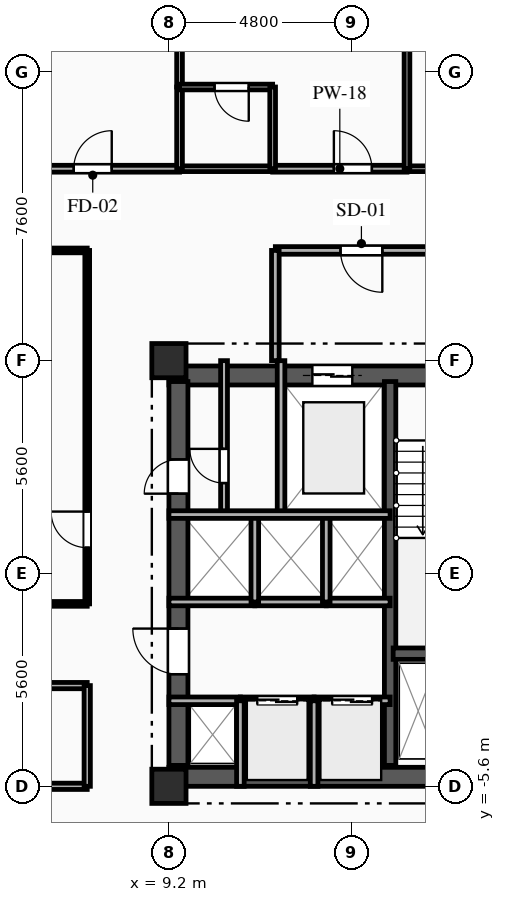
"""IFC4 building model, lengths in metres.
Left out: names, types, materials, properties, quantities, classifications, styles, units other than length and angle.
Written with IfcOpenShell. Run it as: python <this file> out.ifc"""

import sys

from ifc_helpers import new_model, si_unit, direction, frame, frame_2d, origin, origin_2d, place, context, subcontext, project, spatial, rectangle, extrude, element, fill, save


model = new_model("IFC4")
c1 = context("Model", 3, precision=1e-05, world=origin(), true_north=direction((0.0, 1.0)))
c2 = subcontext(c1, "Body", "Model", "MODEL_VIEW")
j1 = project(units=[si_unit("LENGTHUNIT", "METRE"), si_unit("PLANEANGLEUNIT", "RADIAN")], contexts=[c1])
p1 = place(None, origin())
s1 = spatial("IfcSite", under=j1, at=p1, CompositionType="ELEMENT")
p2 = place(p1, origin())
s2 = spatial("IfcBuilding", under=s1, at=p2, CompositionType="ELEMENT")
p3 = place(p2, frame((0.0, 0.0, 141.05)))
s3 = spatial("IfcBuildingStorey", under=s2, at=p3, CompositionType="ELEMENT", Elevation=141.05)
for number, where, z_axis, x_axis in (
    (1, (9.2, -5.6, 0.0), (0.0, 0.0, 1.0), (1.0, 0.0, 0.0)),
    (2, (9.2, 5.6, 0.0), (0.0, 0.0, 1.0), (1.0, 0.0, 0.0)),
):
    element("IfcColumn", number, at=place(p3, frame(where, z_axis=z_axis, x_axis=x_axis)), inside=s3, PredefinedType="COLUMN", context=c2, shape_type="SweptSolid", body=[
        extrude(rectangle(XDim=0.9, YDim=0.9, at=origin_2d()), origin(), (0.0, 0.0, 1.0), 3.35),
    ])
p4 = place(p3, frame((9.2, 5.21, 0.0), z_axis=(0.0, 0.0, 1.0), x_axis=(1.0, 0.0, 0.0)))
e3 = element("IfcWall", 3, at=p4, inside=s3, PredefinedType="SHEAR", context=c2, shape_type="SweptSolid", body=[
    extrude(rectangle(XDim=9.6, YDim=0.5, at=frame_2d((4.8, 0.0))), origin(), (0.0, 0.0, 1.0), 3.04),
])
p5 = place(p4, frame((6.95, 0.0, 0.0)))
e4 = element("IfcOpeningElement", 4, at=p5, cuts=e3, PredefinedType="OPENING", context=c2, shape_type="SweptSolid", body=[
    extrude(rectangle(XDim=1.1, YDim=2.15, at=frame_2d((0.55, 1.075))), frame((0.0, 0.26, 0.0), z_axis=(0.0, -1.0, 0.0), x_axis=(1.0, 0.0, 0.0)), (0.0, 0.0, 1.0), 0.52),
])
p6 = place(p4, frame((3.775, 0.0, 0.0)))
e5 = element("IfcOpeningElement", 5, at=p6, cuts=e3, PredefinedType="OPENING", context=c2, shape_type="SweptSolid", body=[
    extrude(rectangle(XDim=1.05, YDim=2.1, at=frame_2d((0.525, 1.05))), frame((0.0, 0.26, 0.0), z_axis=(0.0, -1.0, 0.0), x_axis=(1.0, 0.0, 0.0)), (0.0, 0.0, 1.0), 0.52),
])
p7 = place(p3, frame((9.2, -5.35, 0.0), z_axis=(0.0, 0.0, 1.0), x_axis=(1.0, 0.0, 0.0)))
e6 = element("IfcWall", 6, at=p7, inside=s3, PredefinedType="SHEAR", context=c2, shape_type="SweptSolid", body=[
    extrude(rectangle(XDim=9.6, YDim=0.5, at=frame_2d((4.8, 0.0))), origin(), (0.0, 0.0, 1.0), 3.04),
])
p8 = place(p7, frame((7.65, 0.0, 0.0)))
e7 = element("IfcOpeningElement", 7, at=p8, cuts=e6, PredefinedType="OPENING", context=c2, shape_type="SweptSolid", body=[
    extrude(rectangle(XDim=0.9, YDim=2.1, at=frame_2d((0.45, 1.05))), frame((0.0, 0.26, 0.0), z_axis=(0.0, -1.0, 0.0), x_axis=(1.0, 0.0, 0.0)), (0.0, 0.0, 1.0), 0.52),
])
p9 = place(p3, frame((9.45, -5.05, 0.0), z_axis=(0.0, 0.0, 1.0), x_axis=(0.0, 1.0, 0.0)))
e8 = element("IfcWall", 8, at=p9, inside=s3, PredefinedType="SHEAR", context=c2, shape_type="SweptSolid", body=[
    extrude(rectangle(XDim=10.1, YDim=0.5, at=frame_2d((5.05, 0.0))), origin(), (0.0, 0.0, 1.0), 3.04),
])
p10 = place(p9, frame((7.15, 0.0, 0.0)))
e9 = element("IfcOpeningElement", 9, at=p10, cuts=e8, PredefinedType="OPENING", context=c2, shape_type="SweptSolid", body=[
    extrude(rectangle(XDim=0.9, YDim=2.1, at=frame_2d((0.45, 1.05))), frame((0.0, 0.26, 0.0), z_axis=(0.0, -1.0, 0.0), x_axis=(1.0, 0.0, 0.0)), (0.0, 0.0, 1.0), 0.52),
])
p11 = place(p9, frame((2.4, 0.0, 0.0)))
e10 = element("IfcOpeningElement", 10, at=p11, cuts=e8, PredefinedType="OPENING", context=c2, shape_type="SweptSolid", body=[
    extrude(rectangle(XDim=1.2, YDim=2.15, at=frame_2d((0.6, 1.075))), frame((0.0, 0.26, 0.0), z_axis=(0.0, -1.0, 0.0), x_axis=(1.0, 0.0, 0.0)), (0.0, 0.0, 1.0), 0.52),
])
p12 = place(p3, frame((15.02, -5.05, 0.0), z_axis=(0.0, 0.0, 1.0), x_axis=(0.0, 1.0, 0.0)))
e11 = element("IfcWall", 11, at=p12, inside=s3, PredefinedType="SHEAR", context=c2, shape_type="SweptSolid", body=[
    extrude(rectangle(XDim=10.1, YDim=0.3, at=frame_2d((5.05, 0.0))), origin(), (0.0, 0.0, 1.0), 3.04),
])
p13 = place(p3, frame((15.1, -2.11, 0.0), z_axis=(0.0, 0.0, 1.0), x_axis=(1.0, 0.0, 0.0)))
e12 = element("IfcWall", 12, at=p13, inside=s3, PredefinedType="SHEAR", context=c2, shape_type="SweptSolid", body=[
    extrude(rectangle(XDim=3.18, YDim=0.3, at=frame_2d((1.59, 0.0))), origin(), (0.0, 0.0, 1.0), 3.04),
])
p14 = place(p3, frame((12.15, 5.6, 0.0), z_axis=(0.0, 0.0, 1.0), x_axis=(0.0, -1.0, 0.0)))
e13 = element("IfcWall", 13, at=p14, inside=s3, PredefinedType="PARTITIONING", context=c2, shape_type="SweptSolid", body=[
    extrude(rectangle(XDim=4.05, YDim=0.2, at=frame_2d((2.025, 0.0))), origin(), (0.0, 0.0, 1.0), 3.04),
])
p15 = place(p3, frame((18.8, 8.5, 0.0), z_axis=(0.0, 0.0, 1.0), x_axis=(-1.0, 0.0, 0.0)))
e14 = element("IfcWall", 14, at=p15, inside=s3, PredefinedType="PARTITIONING", context=c2, shape_type="SweptSolid", body=[
    extrude(rectangle(XDim=6.8, YDim=0.2, at=frame_2d((3.4, 0.0))), origin(), (0.0, 0.0, 1.0), 3.04),
])
p16 = place(p15, frame((3.985, 0.0, 0.0)))
e15 = element("IfcOpeningElement", 15, at=p16, cuts=e14, PredefinedType="OPENING", context=c2, shape_type="SweptSolid", body=[
    extrude(rectangle(XDim=1.1, YDim=2.15, at=frame_2d((0.55, 1.075))), frame((0.0, 0.11, 0.0), z_axis=(0.0, -1.0, 0.0), x_axis=(1.0, 0.0, 0.0)), (0.0, 0.0, 1.0), 0.22),
])
p17 = place(p3, frame((12.0, 8.5, 0.0), z_axis=(0.0, 0.0, 1.0), x_axis=(0.0, -1.0, 0.0)))
e16 = element("IfcWall", 16, at=p17, inside=s3, PredefinedType="PARTITIONING", context=c2, shape_type="SweptSolid", body=[
    extrude(rectangle(XDim=2.9, YDim=0.2, at=frame_2d((1.45, 0.0))), origin(), (0.0, 0.0, 1.0), 3.04),
])
p18 = place(p3, frame((10.65, 1.55, 0.0), z_axis=(0.0, 0.0, 1.0), x_axis=(0.0, 1.0, 0.0)))
e17 = element("IfcWall", 17, at=p18, inside=s3, PredefinedType="PARTITIONING", context=c2, shape_type="SweptSolid", body=[
    extrude(rectangle(XDim=4.05, YDim=0.18, at=frame_2d((2.025, 0.0))), origin(), (0.0, 0.0, 1.0), 3.04),
])
p19 = place(p18, frame((0.829, 0.0, 0.0)))
e18 = element("IfcOpeningElement", 18, at=p19, cuts=e17, PredefinedType="OPENING", context=c2, shape_type="SweptSolid", body=[
    extrude(rectangle(XDim=0.9, YDim=2.1, at=frame_2d((0.45, 1.05))), frame((0.0, 0.1, 0.0), z_axis=(0.0, -1.0, 0.0), x_axis=(1.0, 0.0, 0.0)), (0.0, 0.0, 1.0), 0.2),
])
p20 = place(p3, frame((9.2, -3.35, 0.0), z_axis=(0.0, 0.0, 1.0), x_axis=(1.0, 0.0, 0.0)))
e19 = element("IfcWall", 19, at=p20, inside=s3, PredefinedType="PARTITIONING", context=c2, shape_type="SweptSolid", body=[
    extrude(rectangle(XDim=1.88, YDim=0.2, at=frame_2d((0.94, 0.0))), origin(), (0.0, 0.0, 1.0), 2.755),
])
p21 = place(p3, frame((11.08, -3.35, 0.0), z_axis=(0.0, 0.0, 1.0), x_axis=(1.0, 0.0, 0.0)))
e20 = element("IfcWall", 20, at=p21, inside=s3, PredefinedType="PARTITIONING", context=c2, shape_type="SweptSolid", body=[
    extrude(rectangle(XDim=1.94, YDim=0.2, at=frame_2d((0.97, 0.0))), origin(), (0.0, 0.0, 1.0), 3.04),
])
p22 = place(p21, frame((0.445, 0.0, 0.0)))
e21 = element("IfcOpeningElement", 21, at=p22, cuts=e20, PredefinedType="OPENING", context=c2, shape_type="SweptSolid", body=[
    extrude(rectangle(XDim=1.05, YDim=2.1, at=frame_2d((0.525, 1.05))), frame((0.0, 0.11, 0.0), z_axis=(0.0, -1.0, 0.0), x_axis=(1.0, 0.0, 0.0)), (0.0, 0.0, 1.0), 0.22),
])
p23 = place(p3, frame((13.02, -3.35, 0.0), z_axis=(0.0, 0.0, 1.0), x_axis=(1.0, 0.0, 0.0)))
e22 = element("IfcWall", 22, at=p23, inside=s3, PredefinedType="PARTITIONING", context=c2, shape_type="SweptSolid", body=[
    extrude(rectangle(XDim=2.0, YDim=0.2, at=frame_2d((1.0, 0.0))), origin(), (0.0, 0.0, 1.0), 3.04),
])
p24 = place(p23, frame((0.475, 0.0, 0.0)))
e23 = element("IfcOpeningElement", 23, at=p24, cuts=e22, PredefinedType="OPENING", context=c2, shape_type="SweptSolid", body=[
    extrude(rectangle(XDim=1.05, YDim=2.1, at=frame_2d((0.525, 1.05))), frame((0.0, 0.11, 0.0), z_axis=(0.0, -1.0, 0.0), x_axis=(1.0, 0.0, 0.0)), (0.0, 0.0, 1.0), 0.22),
])
p25 = place(p3, frame((11.46, -0.75, 0.0), z_axis=(0.0, 0.0, 1.0), x_axis=(-1.0, 0.0, 0.0)))
e24 = element("IfcWall", 24, at=p25, inside=s3, PredefinedType="PARTITIONING", context=c2, shape_type="SweptSolid", body=[
    extrude(rectangle(XDim=2.26, YDim=0.2, at=frame_2d((1.13, 0.0))), origin(), (0.0, 0.0, 1.0), 3.04),
])
p26 = place(p3, frame((13.34, -0.75, 0.0), z_axis=(0.0, 0.0, 1.0), x_axis=(-1.0, 0.0, 0.0)))
e25 = element("IfcWall", 25, at=p26, inside=s3, PredefinedType="PARTITIONING", context=c2, shape_type="SweptSolid", body=[
    extrude(rectangle(XDim=1.88, YDim=0.2, at=frame_2d((0.94, 0.0))), origin(), (0.0, 0.0, 1.0), 3.04),
])
p27 = place(p3, frame((15.02, -0.75, 0.0), z_axis=(0.0, 0.0, 1.0), x_axis=(-1.0, 0.0, 0.0)))
e26 = element("IfcWall", 26, at=p27, inside=s3, PredefinedType="PARTITIONING", context=c2, shape_type="SweptSolid", body=[
    extrude(rectangle(XDim=1.68, YDim=0.2, at=frame_2d((0.84, 0.0))), origin(), (0.0, 0.0, 1.0), 3.04),
])
for number, where, z_axis, x_axis in (
    (27, (11.08, -5.6, 0.0), (0.0, 0.0, 1.0), (0.0, 1.0, 0.0)),
    (28, (13.02, -5.6, 0.0), (0.0, 0.0, 1.0), (0.0, 1.0, 0.0)),
):
    element("IfcWall", number, at=place(p3, frame(where, z_axis=z_axis, x_axis=x_axis)), inside=s3, PredefinedType="PARTITIONING", context=c2, shape_type="SweptSolid", body=[
        extrude(rectangle(XDim=2.25, YDim=0.2, at=frame_2d((1.125, 0.0))), origin(), (0.0, 0.0, 1.0), 3.04),
    ])
for number, where, z_axis, x_axis in (
    (29, (11.46, -0.75, 0.0), (0.0, 0.0, 1.0), (0.0, 1.0, 0.0)),
    (30, (13.34, -0.75, 0.0), (0.0, 0.0, 1.0), (0.0, 1.0, 0.0)),
):
    element("IfcWall", number, at=place(p3, frame(where, z_axis=z_axis, x_axis=x_axis)), inside=s3, PredefinedType="PARTITIONING", context=c2, shape_type="SweptSolid", body=[
        extrude(rectangle(XDim=2.3, YDim=0.2, at=frame_2d((1.15, 0.0))), origin(), (0.0, 0.0, 1.0), 3.04),
    ])
p28 = place(p3, frame((5.943, 10.65, 0.0), z_axis=(0.0, 0.0, 1.0), x_axis=(1.0, 0.0, 0.0)))
e31 = element("IfcWall", 31, at=p28, inside=s3, PredefinedType="PARTITIONING", context=c2, shape_type="SweptSolid", body=[
    extrude(rectangle(XDim=3.536, YDim=0.18, at=frame_2d((1.768, 0.0))), origin(), (0.0, 0.0, 1.0), 3.04),
])
p29 = place(p28, frame((0.752, 0.0, 0.0)))
e32 = element("IfcOpeningElement", 32, at=p29, cuts=e31, PredefinedType="OPENING", context=c2, shape_type="SweptSolid", body=[
    extrude(rectangle(XDim=1.0, YDim=2.15, at=frame_2d((0.5, 1.075))), frame((0.0, 0.1, 0.0), z_axis=(0.0, -1.0, 0.0), x_axis=(1.0, 0.0, 0.0)), (0.0, 0.0, 1.0), 0.2),
])
p30 = place(p3, frame((11.929, 10.65, 0.0), z_axis=(0.0, 0.0, 1.0), x_axis=(1.0, 0.0, 0.0)))
e33 = element("IfcWall", 33, at=p30, inside=s3, PredefinedType="PARTITIONING", context=c2, shape_type="SweptSolid", body=[
    extrude(rectangle(XDim=3.535, YDim=0.18, at=frame_2d((1.768, 0.0))), origin(), (0.0, 0.0, 1.0), 3.04),
])
p31 = place(p30, frame((1.611, 0.0, 0.0)))
e34 = element("IfcOpeningElement", 34, at=p31, cuts=e33, PredefinedType="OPENING", context=c2, shape_type="SweptSolid", body=[
    extrude(rectangle(XDim=1.0, YDim=2.15, at=frame_2d((0.5, 1.075))), frame((0.0, 0.1, 0.0), z_axis=(0.0, -1.0, 0.0), x_axis=(1.0, 0.0, 0.0)), (0.0, 0.0, 1.0), 0.2),
])
p32 = place(p3, frame((9.479, 10.65, 0.0), z_axis=(0.0, 0.0, 1.0), x_axis=(1.0, 0.0, 0.0)))
e35 = element("IfcWall", 35, at=p32, inside=s3, PredefinedType="PLUMBINGWALL", context=c2, shape_type="SweptSolid", body=[
    extrude(rectangle(XDim=2.45, YDim=0.15, at=frame_2d((1.225, 0.0))), origin(), (0.0, 0.0, 1.0), 3.04),
])
p33 = place(p3, frame((15.464, 10.65, 0.0), z_axis=(0.0, 0.0, 1.0), x_axis=(1.0, 0.0, 0.0)))
e36 = element("IfcWall", 36, at=p33, inside=s3, PredefinedType="PARTITIONING", context=c2, shape_type="SweptSolid", body=[
    extrude(rectangle(XDim=5.486, YDim=0.15, at=frame_2d((2.743, 0.0))), origin(), (0.0, 0.0, 1.0), 3.04),
])
p34 = place(p33, frame((0.99, 0.0, 0.0)))
e37 = element("IfcOpeningElement", 37, at=p34, cuts=e36, PredefinedType="OPENING", context=c2, shape_type="SweptSolid", body=[
    extrude(rectangle(XDim=1.05, YDim=2.15, at=frame_2d((0.525, 1.075))), frame((0.0, 0.085, 0.0), z_axis=(0.0, -1.0, 0.0), x_axis=(1.0, 0.0, 0.0)), (0.0, 0.0, 1.0), 0.17),
])
p35 = place(p3, frame((7.05, 8.5, 0.0), z_axis=(0.0, 0.0, 1.0), x_axis=(-1.0, 0.0, 0.0)))
e38 = element("IfcWall", 38, at=p35, inside=s3, PredefinedType="PARTITIONING", context=c2, shape_type="SweptSolid", body=[
    extrude(rectangle(XDim=7.05, YDim=0.125, at=frame_2d((3.525, 0.0))), origin(), (0.0, 0.0, 1.0), 3.04),
])
p36 = place(p3, frame((0.0, -5.6, 0.0), z_axis=(0.0, 0.0, 1.0), x_axis=(1.0, 0.0, 0.0)))
e39 = element("IfcWall", 39, at=p36, inside=s3, PredefinedType="PARTITIONING", context=c2, shape_type="SweptSolid", body=[
    extrude(rectangle(XDim=7.05, YDim=0.165, at=frame_2d((3.525, 0.0))), origin(), (0.0, 0.0, 1.0), 2.525),
])
p37 = place(p3, frame((0.0, -0.8, 0.0), z_axis=(0.0, 0.0, 1.0), x_axis=(1.0, 0.0, 0.0)))
e40 = element("IfcWall", 40, at=p37, inside=s3, PredefinedType="PARTITIONING", context=c2, shape_type="SweptSolid", body=[
    extrude(rectangle(XDim=7.05, YDim=0.125, at=frame_2d((3.525, 0.0))), origin(), (0.0, 0.0, 1.0), 3.04),
])
p38 = place(p3, frame((7.05, -2.95, 0.0), z_axis=(0.0, 0.0, 1.0), x_axis=(-1.0, 0.0, 0.0)))
e41 = element("IfcWall", 41, at=p38, inside=s3, PredefinedType="PARTITIONING", context=c2, shape_type="SweptSolid", body=[
    extrude(rectangle(XDim=14.1, YDim=0.165, at=frame_2d((7.05, 0.0))), origin(), (0.0, 0.0, 1.0), 3.04),
])
p39 = place(p38, frame((6.475, 0.0, 0.0)))
e42 = element("IfcOpeningElement", 42, at=p39, cuts=e41, PredefinedType="OPENING", context=c2, shape_type="SweptSolid", body=[
    extrude(rectangle(XDim=1.15, YDim=2.15, at=frame_2d((0.575, 1.075))), frame((0.0, 0.093, 0.0), z_axis=(0.0, -1.0, 0.0), x_axis=(1.0, 0.0, 0.0)), (0.0, 0.0, 1.0), 0.185),
])
p40 = place(p3, frame((7.05, -0.8, 0.0), z_axis=(0.0, 0.0, 1.0), x_axis=(0.0, 1.0, 0.0)))
e43 = element("IfcWall", 43, at=p40, inside=s3, PredefinedType="PARTITIONING", context=c2, shape_type="SweptSolid", body=[
    extrude(rectangle(XDim=9.3, YDim=0.125, at=frame_2d((4.65, 0.0))), origin(), (0.0, 0.0, 1.0), 3.04),
])
p41 = place(p40, frame((1.479, 0.0, 0.0)))
e44 = element("IfcOpeningElement", 44, at=p41, cuts=e43, PredefinedType="OPENING", context=c2, shape_type="SweptSolid", body=[
    extrude(rectangle(XDim=0.95, YDim=2.1, at=frame_2d((0.475, 1.05))), frame((0.0, 0.073, 0.0), z_axis=(0.0, -1.0, 0.0), x_axis=(1.0, 0.0, 0.0)), (0.0, 0.0, 1.0), 0.145),
])
p42 = place(p3, frame((7.05, -5.6, 0.0), z_axis=(0.0, 0.0, 1.0), x_axis=(0.0, 1.0, 0.0)))
e45 = element("IfcWall", 45, at=p42, inside=s3, PredefinedType="PARTITIONING", context=c2, shape_type="SweptSolid", body=[
    extrude(rectangle(XDim=2.65, YDim=0.165, at=frame_2d((1.325, 0.0))), origin(), (0.0, 0.0, 1.0), 3.04),
])
p43 = place(p3, frame((9.479, 20.4, 0.0), z_axis=(0.0, 0.0, 1.0), x_axis=(0.0, -1.0, 0.0)))
e46 = element("IfcWall", 46, at=p43, inside=s3, PredefinedType="PARTITIONING", context=c2, shape_type="SweptSolid", body=[
    extrude(rectangle(XDim=7.6, YDim=0.15, at=frame_2d((3.8, 0.0))), origin(), (0.0, 0.0, 1.0), 3.04),
])
p44 = place(p3, frame((9.479, 12.8, 0.0), z_axis=(0.0, 0.0, 1.0), x_axis=(0.0, -1.0, 0.0)))
e47 = element("IfcWall", 47, at=p44, inside=s3, PredefinedType="PLUMBINGWALL", context=c2, shape_type="SweptSolid", body=[
    extrude(rectangle(XDim=2.15, YDim=0.15, at=frame_2d((1.075, 0.0))), origin(), (0.0, 0.0, 1.0), 3.04),
])
p45 = place(p3, frame((11.929, 12.8, 0.0), z_axis=(0.0, 0.0, 1.0), x_axis=(-1.0, 0.0, 0.0)))
e48 = element("IfcWall", 48, at=p45, inside=s3, PredefinedType="PLUMBINGWALL", context=c2, shape_type="SweptSolid", body=[
    extrude(rectangle(XDim=2.45, YDim=0.15, at=frame_2d((1.225, 0.0))), origin(), (0.0, 0.0, 1.0), 3.04),
])
p46 = place(p45, frame((0.629, 0.0, 0.0)))
e49 = element("IfcOpeningElement", 49, at=p46, cuts=e48, PredefinedType="OPENING", context=c2, shape_type="SweptSolid", body=[
    extrude(rectangle(XDim=0.9, YDim=2.1, at=frame_2d((0.45, 1.05))), frame((0.0, 0.085, 0.0), z_axis=(0.0, -1.0, 0.0), x_axis=(1.0, 0.0, 0.0)), (0.0, 0.0, 1.0), 0.17),
])
p47 = place(p3, frame((11.929, 10.65, 0.0), z_axis=(0.0, 0.0, 1.0), x_axis=(0.0, 1.0, 0.0)))
e50 = element("IfcWall", 50, at=p47, inside=s3, PredefinedType="PLUMBINGWALL", context=c2, shape_type="SweptSolid", body=[
    extrude(rectangle(XDim=2.15, YDim=0.15, at=frame_2d((1.075, 0.0))), origin(), (0.0, 0.0, 1.0), 3.04),
])
p48 = place(p3, frame((15.464, 20.4, 0.0), z_axis=(0.0, 0.0, 1.0), x_axis=(0.0, -1.0, 0.0)))
e51 = element("IfcWall", 51, at=p48, inside=s3, PredefinedType="PARTITIONING", context=c2, shape_type="SweptSolid", body=[
    extrude(rectangle(XDim=9.75, YDim=0.15, at=frame_2d((4.875, 0.0))), origin(), (0.0, 0.0, 1.0), 2.525),
])
p49 = place(p3, frame((9.2, 1.55, 0.0), z_axis=(0.0, 0.0, 1.0), x_axis=(1.0, 0.0, 0.0)))
e52 = element("IfcWall", 52, at=p49, inside=s3, PredefinedType="PARTITIONING", context=c2, shape_type="SweptSolid", body=[
    extrude(rectangle(XDim=5.82, YDim=0.2, at=frame_2d((2.91, 0.0))), origin(), (0.0, 0.0, 1.0), 3.04),
])
p50 = place(p6, origin())
e53 = element("IfcDoor", 53, at=p50, inside=s3, OperationType="DOUBLE_DOOR_SLIDING", PredefinedType="DOOR", context=c2, shape_type="SweptSolid", body=[
    extrude(rectangle(XDim=1.05, YDim=2.1, at=frame_2d((0.525, 1.05))), frame((0.0, 0.025, 0.0), z_axis=(0.0, -1.0, 0.0), x_axis=(1.0, 0.0, 0.0)), (0.0, 0.0, 1.0), 0.05),
])
fill(e5, e53)
p51 = place(p16, origin())
e54 = element("IfcDoor", 54, at=p51, inside=s3, OperationType="SINGLE_SWING_LEFT", PredefinedType="DOOR", context=c2, shape_type="SweptSolid", body=[
    extrude(rectangle(XDim=1.1, YDim=2.15, at=frame_2d((0.55, 1.075))), frame((0.0, 0.025, 0.0), z_axis=(0.0, -1.0, 0.0), x_axis=(1.0, 0.0, 0.0)), (0.0, 0.0, 1.0), 0.05),
])
fill(e15, e54)
p52 = place(p19, origin())
e55 = element("IfcDoor", 55, at=p52, inside=s3, OperationType="SINGLE_SWING_RIGHT", PredefinedType="DOOR", context=c2, shape_type="SweptSolid", body=[
    extrude(rectangle(XDim=0.9, YDim=2.1, at=frame_2d((0.45, 1.05))), frame((0.0, 0.025, 0.0), z_axis=(0.0, -1.0, 0.0), x_axis=(1.0, 0.0, 0.0)), (0.0, 0.0, 1.0), 0.05),
])
fill(e18, e55)
p53 = place(p10, origin())
e56 = element("IfcDoor", 56, at=p53, inside=s3, OperationType="SINGLE_SWING_LEFT", PredefinedType="DOOR", context=c2, shape_type="SweptSolid", body=[
    extrude(rectangle(XDim=0.9, YDim=2.1, at=frame_2d((0.45, 1.05))), frame((0.0, 0.025, 0.0), z_axis=(0.0, -1.0, 0.0), x_axis=(1.0, 0.0, 0.0)), (0.0, 0.0, 1.0), 0.05),
])
fill(e9, e56)
p54 = place(p22, origin())
e57 = element("IfcDoor", 57, at=p54, inside=s3, OperationType="DOUBLE_DOOR_SLIDING", PredefinedType="DOOR", context=c2, shape_type="SweptSolid", body=[
    extrude(rectangle(XDim=1.05, YDim=2.1, at=frame_2d((0.525, 1.05))), frame((0.0, 0.025, 0.0), z_axis=(0.0, -1.0, 0.0), x_axis=(1.0, 0.0, 0.0)), (0.0, 0.0, 1.0), 0.05),
])
fill(e21, e57)
p55 = place(p24, origin())
e58 = element("IfcDoor", 58, at=p55, inside=s3, OperationType="DOUBLE_DOOR_SLIDING", PredefinedType="DOOR", context=c2, shape_type="SweptSolid", body=[
    extrude(rectangle(XDim=1.05, YDim=2.1, at=frame_2d((0.525, 1.05))), frame((0.0, 0.025, 0.0), z_axis=(0.0, -1.0, 0.0), x_axis=(1.0, 0.0, 0.0)), (0.0, 0.0, 1.0), 0.05),
])
fill(e23, e58)
p56 = place(p11, origin())
e59 = element("IfcDoor", 59, at=p56, inside=s3, OperationType="SINGLE_SWING_RIGHT", PredefinedType="DOOR", context=c2, shape_type="SweptSolid", body=[
    extrude(rectangle(XDim=1.2, YDim=2.15, at=frame_2d((0.6, 1.075))), frame((0.0, 0.025, 0.0), z_axis=(0.0, -1.0, 0.0), x_axis=(1.0, 0.0, 0.0)), (0.0, 0.0, 1.0), 0.05),
])
fill(e10, e59)
p57 = place(p29, origin())
e60 = element("IfcDoor", 60, at=p57, inside=s3, OperationType="SINGLE_SWING_RIGHT", PredefinedType="DOOR", context=c2, shape_type="SweptSolid", body=[
    extrude(rectangle(XDim=1.0, YDim=2.15, at=frame_2d((0.5, 1.075))), frame((0.0, 0.025, 0.0), z_axis=(0.0, -1.0, 0.0), x_axis=(1.0, 0.0, 0.0)), (0.0, 0.0, 1.0), 0.05),
])
fill(e32, e60)
p58 = place(p31, origin())
e61 = element("IfcDoor", 61, at=p58, inside=s3, OperationType="SINGLE_SWING_LEFT", PredefinedType="DOOR", context=c2, shape_type="SweptSolid", body=[
    extrude(rectangle(XDim=1.0, YDim=2.15, at=frame_2d((0.5, 1.075))), frame((0.0, 0.025, 0.0), z_axis=(0.0, -1.0, 0.0), x_axis=(1.0, 0.0, 0.0)), (0.0, 0.0, 1.0), 0.05),
])
fill(e34, e61)
p59 = place(p41, origin())
e62 = element("IfcDoor", 62, at=p59, inside=s3, OperationType="SINGLE_SWING_RIGHT", PredefinedType="DOOR", context=c2, shape_type="SweptSolid", body=[
    extrude(rectangle(XDim=0.95, YDim=2.1, at=frame_2d((0.475, 1.05))), frame((0.0, 0.025, 0.0), z_axis=(0.0, -1.0, 0.0), x_axis=(1.0, 0.0, 0.0)), (0.0, 0.0, 1.0), 0.05),
])
fill(e44, e62)
p60 = place(p46, origin())
e63 = element("IfcDoor", 63, at=p60, inside=s3, OperationType="SINGLE_SWING_LEFT", PredefinedType="DOOR", context=c2, shape_type="SweptSolid", body=[
    extrude(rectangle(XDim=0.9, YDim=2.1, at=frame_2d((0.45, 1.05))), frame((0.0, 0.025, 0.0), z_axis=(0.0, -1.0, 0.0), x_axis=(1.0, 0.0, 0.0)), (0.0, 0.0, 1.0), 0.05),
])
fill(e49, e63)
save(model, sys.argv[1])
